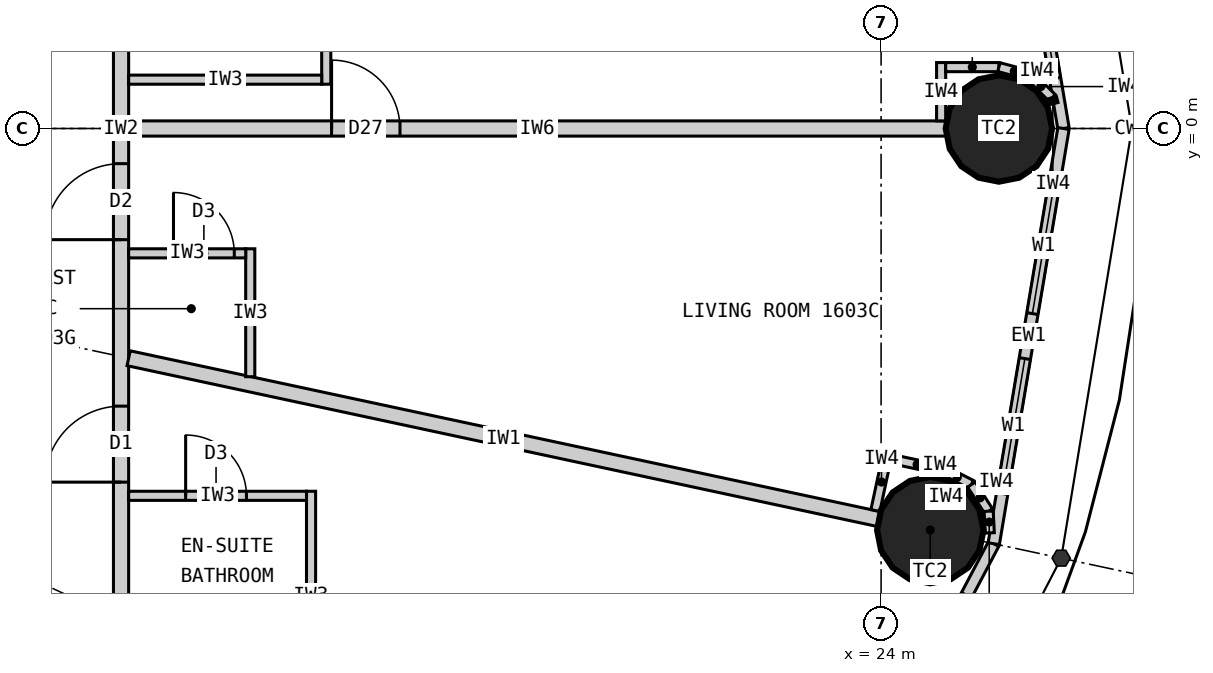
"""IFC4 building model, lengths in metres.
Left out: names, types, materials, properties, quantities, classifications, styles, units other than length and angle.
Written with IfcOpenShell. Run it as: python <this file> out.ifc"""

import sys

from ifc_helpers import new_model, si_unit, direction, frame, frame_2d, origin, origin_2d, place, context, subcontext, project, spatial, rectangle, circle, extrude, element, fill, save


model = new_model("IFC4")
c1 = context("Model", 3, precision=1e-05, world=origin(), true_north=direction((0.0, 1.0)))
c2 = subcontext(c1, "Body", "Model", "MODEL_VIEW")
j1 = project(units=[si_unit("LENGTHUNIT", "METRE"), si_unit("PLANEANGLEUNIT", "RADIAN")], contexts=[c1])
p1 = place(None, origin())
s1 = spatial("IfcSite", under=j1, at=p1, CompositionType="ELEMENT")
p2 = place(p1, origin())
s2 = spatial("IfcBuilding", under=s1, at=p2, CompositionType="ELEMENT")
p3 = place(p2, frame((0.0, 0.0, 67.2)))
s3 = spatial("IfcBuildingStorey", under=s2, at=p3, CompositionType="ELEMENT", Elevation=67.2)
for number, where, z_axis, x_axis in (
    (1, (25.55, 0.0, 0.0), (0.0, 0.0, 1.0), (1.0, 0.0, 0.0)),
    (2, (24.647, -5.283, 0.0), (0.0, 0.0, 1.0), (1.0, 0.0, 0.0)),
):
    element("IfcColumn", number, at=place(p3, frame(where, z_axis=z_axis, x_axis=x_axis)), inside=s3, PredefinedType="COLUMN", context=c2, shape_type="SweptSolid", body=[
        extrude(circle(Radius=0.7, at=origin_2d()), origin(), (0.0, 0.0, 1.0), 3.3),
    ])
p4 = place(p3, frame((26.4, 0.0, 0.0), z_axis=(0.0, 0.0, 1.0), x_axis=(-0.165642551694, 0.986185857264, 0.0)))
e3 = element("IfcWall", 3, at=p4, inside=s3, PredefinedType="ELEMENTEDWALL", context=c2, shape_type="SweptSolid", body=[
    extrude(rectangle(XDim=5.539, YDim=0.15, at=frame_2d((2.77, 0.0))), origin(), (0.0, 0.0, 1.0), 3.12),
])
p5 = place(p4, frame((0.669, 0.0, 0.9)))
e4 = element("IfcOpeningElement", 4, at=p5, cuts=e3, PredefinedType="OPENING", context=c2, shape_type="SweptSolid", body=[
    extrude(rectangle(XDim=1.8, YDim=1.9, at=frame_2d((0.9, 0.95))), frame((0.0, 0.085, 0.0), z_axis=(0.0, -1.0, 0.0), x_axis=(1.0, 0.0, 0.0)), (0.0, 0.0, 1.0), 0.17),
])
p6 = place(p4, frame((3.07, 0.0, 0.9)))
e5 = element("IfcOpeningElement", 5, at=p6, cuts=e3, PredefinedType="OPENING", context=c2, shape_type="SweptSolid", body=[
    extrude(rectangle(XDim=1.8, YDim=1.9, at=frame_2d((0.9, 0.95))), frame((0.0, 0.085, 0.0), z_axis=(0.0, -1.0, 0.0), x_axis=(1.0, 0.0, 0.0)), (0.0, 0.0, 1.0), 0.17),
])
p7 = place(p3, frame((22.803, -10.532, 0.0), z_axis=(0.0, 0.0, 1.0), x_axis=(0.467296867008, 0.884100468321, 0.0)))
e6 = element("IfcWall", 6, at=p7, inside=s3, PredefinedType="ELEMENTEDWALL", context=c2, shape_type="SweptSolid", body=[
    extrude(rectangle(XDim=5.734, YDim=0.15, at=frame_2d((2.867, 0.0))), origin(), (0.0, 0.0, 1.0), 3.12),
])
p8 = place(p7, frame((0.767, 0.0, 0.9)))
e7 = element("IfcOpeningElement", 7, at=p8, cuts=e6, PredefinedType="OPENING", context=c2, shape_type="SweptSolid", body=[
    extrude(rectangle(XDim=1.8, YDim=1.9, at=frame_2d((0.9, 0.95))), frame((0.0, 0.085, 0.0), z_axis=(0.0, -1.0, 0.0), x_axis=(1.0, 0.0, 0.0)), (0.0, 0.0, 1.0), 0.17),
])
p9 = place(p7, frame((3.167, 0.0, 0.9)))
e8 = element("IfcOpeningElement", 8, at=p9, cuts=e6, PredefinedType="OPENING", context=c2, shape_type="SweptSolid", body=[
    extrude(rectangle(XDim=1.8, YDim=1.9, at=frame_2d((0.9, 0.95))), frame((0.0, 0.085, 0.0), z_axis=(0.0, -1.0, 0.0), x_axis=(1.0, 0.0, 0.0)), (0.0, 0.0, 1.0), 0.17),
])
p10 = place(p3, frame((25.482, -5.462, 0.0), z_axis=(0.0, 0.0, 1.0), x_axis=(0.165642551694, 0.986185857264, 0.0)))
e9 = element("IfcWall", 9, at=p10, inside=s3, PredefinedType="ELEMENTEDWALL", context=c2, shape_type="SweptSolid", body=[
    extrude(rectangle(XDim=5.539, YDim=0.15, at=frame_2d((2.77, 0.0))), origin(), (0.0, 0.0, 1.0), 3.12),
])
p11 = place(p10, frame((0.669, 0.0, 0.9)))
e10 = element("IfcOpeningElement", 10, at=p11, cuts=e9, PredefinedType="OPENING", context=c2, shape_type="SweptSolid", body=[
    extrude(rectangle(XDim=1.8, YDim=1.9, at=frame_2d((0.9, 0.95))), frame((0.0, 0.085, 0.0), z_axis=(0.0, -1.0, 0.0), x_axis=(1.0, 0.0, 0.0)), (0.0, 0.0, 1.0), 0.17),
])
p12 = place(p10, frame((3.07, 0.0, 0.9)))
e11 = element("IfcOpeningElement", 11, at=p12, cuts=e9, PredefinedType="OPENING", context=c2, shape_type="SweptSolid", body=[
    extrude(rectangle(XDim=1.8, YDim=1.9, at=frame_2d((0.9, 0.95))), frame((0.0, 0.085, 0.0), z_axis=(0.0, -1.0, 0.0), x_axis=(1.0, 0.0, 0.0)), (0.0, 0.0, 1.0), 0.17),
])
p13 = place(p3, frame((14.0, -9.9, 0.0), z_axis=(0.0, 0.0, 1.0), x_axis=(0.0, 1.0, 0.0)))
e12 = element("IfcWall", 12, at=p13, inside=s3, PredefinedType="PARTITIONING", context=c2, shape_type="SweptSolid", body=[
    extrude(rectangle(XDim=19.8, YDim=0.2, at=frame_2d((9.9, 0.0))), origin(), (0.0, 0.0, 1.0), 3.12),
])
p14 = place(p13, frame((0.103, 0.0, 0.0)))
e13 = element("IfcOpeningElement", 13, at=p14, cuts=e12, PredefinedType="OPENING", context=c2, shape_type="SweptSolid", body=[
    extrude(rectangle(XDim=1.0, YDim=2.2, at=frame_2d((0.5, 1.1))), frame((0.0, 0.11, 0.0), z_axis=(0.0, -1.0, 0.0), x_axis=(1.0, 0.0, 0.0)), (0.0, 0.0, 1.0), 0.22),
])
p15 = place(p13, frame((5.248, 0.0, 0.0)))
e14 = element("IfcOpeningElement", 14, at=p15, cuts=e12, PredefinedType="OPENING", context=c2, shape_type="SweptSolid", body=[
    extrude(rectangle(XDim=1.0, YDim=2.2, at=frame_2d((0.5, 1.1))), frame((0.0, 0.11, 0.0), z_axis=(0.0, -1.0, 0.0), x_axis=(1.0, 0.0, 0.0)), (0.0, 0.0, 1.0), 0.22),
])
p16 = place(p13, frame((8.438, 0.0, 0.0)))
e15 = element("IfcOpeningElement", 15, at=p16, cuts=e12, PredefinedType="OPENING", context=c2, shape_type="SweptSolid", body=[
    extrude(rectangle(XDim=1.0, YDim=2.2, at=frame_2d((0.5, 1.1))), frame((0.0, 0.11, 0.0), z_axis=(0.0, -1.0, 0.0), x_axis=(1.0, 0.0, 0.0)), (0.0, 0.0, 1.0), 0.22),
])
p17 = place(p13, frame((14.532, 0.0, 0.0)))
e16 = element("IfcOpeningElement", 16, at=p17, cuts=e12, PredefinedType="OPENING", context=c2, shape_type="SweptSolid", body=[
    extrude(rectangle(XDim=1.0, YDim=2.2, at=frame_2d((0.5, 1.1))), frame((0.0, 0.11, 0.0), z_axis=(0.0, -1.0, 0.0), x_axis=(1.0, 0.0, 0.0)), (0.0, 0.0, 1.0), 0.22),
])
p18 = place(p3, frame((14.1, 0.0, 0.0), z_axis=(0.0, 0.0, 1.0), x_axis=(1.0, 0.0, 0.0)))
e17 = element("IfcWall", 17, at=p18, inside=s3, PredefinedType="PARTITIONING", context=c2, shape_type="SweptSolid", body=[
    extrude(rectangle(XDim=10.75, YDim=0.2, at=frame_2d((5.375, 0.0))), origin(), (0.0, 0.0, 1.0), 2.27),
])
p19 = place(p18, frame((2.67, 0.0, 0.0)))
e18 = element("IfcOpeningElement", 18, at=p19, cuts=e17, PredefinedType="OPENING", context=c2, shape_type="SweptSolid", body=[
    extrude(rectangle(XDim=0.9, YDim=2.1, at=frame_2d((0.45, 1.05))), frame((0.0, 0.11, 0.0), z_axis=(0.0, -1.0, 0.0), x_axis=(1.0, 0.0, 0.0)), (0.0, 0.0, 1.0), 0.22),
])
p20 = place(p3, frame((14.1, -3.022, 0.0), z_axis=(0.0, 0.0, 1.0), x_axis=(0.977790014929, -0.209586943072, 0.0)))
e19 = element("IfcWall", 19, at=p20, inside=s3, PredefinedType="PARTITIONING", context=c2, shape_type="SweptSolid", body=[
    extrude(rectangle(XDim=10.087, YDim=0.2, at=frame_2d((5.043, 0.0))), origin(), (0.0, 0.0, 1.0), 2.32),
])
p21 = place(p3, frame((16.5, -7.521, 0.0), z_axis=(0.0, 0.0, 1.0), x_axis=(0.0, 1.0, 0.0)))
e20 = element("IfcWall", 20, at=p21, inside=s3, PredefinedType="PARTITIONING", context=c2, shape_type="SweptSolid", body=[
    extrude(rectangle(XDim=2.749, YDim=0.12, at=frame_2d((1.374, 0.0))), origin(), (0.0, 0.0, 1.0), 3.12),
])
p22 = place(p3, frame((14.1, -4.833, 0.0), z_axis=(0.0, 0.0, 1.0), x_axis=(1.0, 0.0, 0.0)))
e21 = element("IfcWall", 21, at=p22, inside=s3, PredefinedType="PARTITIONING", context=c2, shape_type="SweptSolid", body=[
    extrude(rectangle(XDim=2.34, YDim=0.12, at=frame_2d((1.17, 0.0))), origin(), (0.0, 0.0, 1.0), 3.12),
])
p23 = place(p22, frame((0.75, 0.0, 0.0)))
e22 = element("IfcOpeningElement", 22, at=p23, cuts=e21, PredefinedType="OPENING", context=c2, shape_type="SweptSolid", body=[
    extrude(rectangle(XDim=0.8, YDim=2.1, at=frame_2d((0.4, 1.05))), frame((0.0, 0.07, 0.0), z_axis=(0.0, -1.0, 0.0), x_axis=(1.0, 0.0, 0.0)), (0.0, 0.0, 1.0), 0.14),
])
p24 = place(p3, frame((15.7, -3.265, 0.0), z_axis=(0.0, 0.0, 1.0), x_axis=(0.0, 1.0, 0.0)))
e23 = element("IfcWall", 23, at=p24, inside=s3, PredefinedType="PARTITIONING", context=c2, shape_type="SweptSolid", body=[
    extrude(rectangle(XDim=1.683, YDim=0.12, at=frame_2d((0.841, 0.0))), origin(), (0.0, 0.0, 1.0), 3.12),
])
p25 = place(p3, frame((14.1, -1.643, 0.0), z_axis=(0.0, 0.0, 1.0), x_axis=(1.0, 0.0, 0.0)))
e24 = element("IfcWall", 24, at=p25, inside=s3, PredefinedType="PARTITIONING", context=c2, shape_type="SweptSolid", body=[
    extrude(rectangle(XDim=1.54, YDim=0.12, at=frame_2d((0.77, 0.0))), origin(), (0.0, 0.0, 1.0), 2.32),
])
p26 = place(p25, frame((0.59, 0.0, 0.0)))
e25 = element("IfcOpeningElement", 25, at=p26, cuts=e24, PredefinedType="OPENING", context=c2, shape_type="SweptSolid", body=[
    extrude(rectangle(XDim=0.8, YDim=2.1, at=frame_2d((0.4, 1.05))), frame((0.0, 0.07, 0.0), z_axis=(0.0, -1.0, 0.0), x_axis=(1.0, 0.0, 0.0)), (0.0, 0.0, 1.0), 0.14),
])
p27 = place(p3, frame((16.7, 3.48, 0.0), z_axis=(0.0, 0.0, 1.0), x_axis=(0.0, -1.0, 0.0)))
e26 = element("IfcWall", 26, at=p27, inside=s3, PredefinedType="PARTITIONING", context=c2, shape_type="SweptSolid", body=[
    extrude(rectangle(XDim=2.897, YDim=0.12, at=frame_2d((1.449, 0.0))), origin(), (0.0, 0.0, 1.0), 3.12),
])
p28 = place(p27, frame((1.049, 0.0, 0.0)))
e27 = element("IfcOpeningElement", 27, at=p28, cuts=e26, PredefinedType="OPENING", context=c2, shape_type="SweptSolid", body=[
    extrude(rectangle(XDim=0.8, YDim=2.1, at=frame_2d((0.4, 1.05))), frame((0.0, 0.07, 0.0), z_axis=(0.0, -1.0, 0.0), x_axis=(1.0, 0.0, 0.0)), (0.0, 0.0, 1.0), 0.14),
])
p29 = place(p3, frame((14.1, 0.643, 0.0), z_axis=(0.0, 0.0, 1.0), x_axis=(1.0, 0.0, 0.0)))
e28 = element("IfcWall", 28, at=p29, inside=s3, PredefinedType="PARTITIONING", context=c2, shape_type="SweptSolid", body=[
    extrude(rectangle(XDim=2.54, YDim=0.12, at=frame_2d((1.27, 0.0))), origin(), (0.0, 0.0, 1.0), 3.12),
])
p30 = place(p3, frame((24.79, 0.1, 0.0), z_axis=(0.0, 0.0, 1.0), x_axis=(0.0, 1.0, 0.0)))
e29 = element("IfcWall", 29, at=p30, inside=s3, PredefinedType="PARTITIONING", context=c2, shape_type="SweptSolid", body=[
    extrude(rectangle(XDim=0.767, YDim=0.12, at=frame_2d((0.384, 0.0))), origin(), (0.0, 0.0, 1.0), 3.12),
])
p31 = place(p3, frame((24.85, 0.808, 0.0), z_axis=(0.0, 0.0, 1.0), x_axis=(1.0, 0.0, 0.0)))
e30 = element("IfcWall", 30, at=p31, inside=s3, PredefinedType="PARTITIONING", context=c2, shape_type="SweptSolid", body=[
    extrude(rectangle(XDim=0.7, YDim=0.12, at=frame_2d((0.35, 0.0))), origin(), (0.0, 0.0, 1.0), 3.12),
])
p32 = place(p3, frame((25.55, 0.808, 0.0), z_axis=(0.0, 0.0, 1.0), x_axis=(0.965807183573, -0.2592614205, 0.0)))
e31 = element("IfcWall", 31, at=p32, inside=s3, PredefinedType="PARTITIONING", context=c2, shape_type="SweptSolid", body=[
    extrude(rectangle(XDim=0.418, YDim=0.12, at=frame_2d((0.209, 0.0))), origin(), (0.0, 0.0, 1.0), 3.12),
])
p33 = place(p3, frame((25.954, 0.699, 0.0), z_axis=(0.0, 0.0, 1.0), x_axis=(0.707106781187, -0.707106781187, 0.0)))
e32 = element("IfcWall", 32, at=p33, inside=s3, PredefinedType="PARTITIONING", context=c2, shape_type="SweptSolid", body=[
    extrude(rectangle(XDim=0.418, YDim=0.12, at=frame_2d((0.209, 0.0))), origin(), (0.0, 0.0, 1.0), 3.12),
])
p34 = place(p3, frame((26.249, 0.404, 0.0), z_axis=(0.0, 0.0, 1.0), x_axis=(0.259754282609, -0.965674744759, 0.0)))
e33 = element("IfcWall", 33, at=p34, inside=s3, PredefinedType="PARTITIONING", context=c2, shape_type="SweptSolid", body=[
    extrude(rectangle(XDim=0.08, YDim=0.12, at=frame_2d((0.04, 0.0))), origin(), (0.0, 0.0, 1.0), 3.12),
])
p35 = place(p3, frame((23.925, -5.026, 0.0), z_axis=(0.0, 0.0, 1.0), x_axis=(0.209681192172, 0.977769808109, 0.0)))
e34 = element("IfcWall", 34, at=p35, inside=s3, PredefinedType="PARTITIONING", context=c2, shape_type="SweptSolid", body=[
    extrude(rectangle(XDim=0.767, YDim=0.12, at=frame_2d((0.384, 0.0))), origin(), (0.0, 0.0, 1.0), 3.12),
])
p36 = place(p3, frame((24.132, -4.347, 0.0), z_axis=(0.0, 0.0, 1.0), x_axis=(0.977776882509, -0.209648200638, 0.0)))
e35 = element("IfcWall", 35, at=p36, inside=s3, PredefinedType="PARTITIONING", context=c2, shape_type="SweptSolid", body=[
    extrude(rectangle(XDim=0.7, YDim=0.12, at=frame_2d((0.35, 0.0))), origin(), (0.0, 0.0, 1.0), 3.12),
])
for number, where, z_axis, x_axis in (
    (36, (24.816, -4.494, 0.0), (0.0, 0.0, 1.0), (0.89, -0.455, 0.0)),
    (37, (25.188, -4.684, 0.0), (0.0, 0.0, 1.0), (0.543, -0.84, 0.0)),
):
    element("IfcWall", number, at=place(p3, frame(where, z_axis=z_axis, x_axis=x_axis)), inside=s3, PredefinedType="PARTITIONING", context=c2, shape_type="SweptSolid", body=[
        extrude(rectangle(XDim=0.418, YDim=0.12, at=frame_2d((0.209, 0.0))), origin(), (0.0, 0.0, 1.0), 3.12),
    ])
p37 = place(p3, frame((25.416, -5.035, 0.0), z_axis=(0.0, 0.0, 1.0), x_axis=(0.050406329159, -0.998728793007, 0.0)))
e38 = element("IfcWall", 38, at=p37, inside=s3, PredefinedType="PARTITIONING", context=c2, shape_type="SweptSolid", body=[
    extrude(rectangle(XDim=0.286, YDim=0.12, at=frame_2d((0.143, 0.0))), origin(), (0.0, 0.0, 1.0), 3.12),
])
p38 = place(p5, origin())
e39 = element("IfcWindow", 39, at=p38, inside=s3, PartitioningType="SINGLE_PANEL", PredefinedType="WINDOW", context=c2, shape_type="SweptSolid", body=[
    extrude(rectangle(XDim=1.8, YDim=1.9, at=frame_2d((0.9, 0.95))), frame((0.0, 0.03, 0.0), z_axis=(0.0, -1.0, 0.0), x_axis=(1.0, 0.0, 0.0)), (0.0, 0.0, 1.0), 0.06),
])
fill(e4, e39)
p39 = place(p11, origin())
e40 = element("IfcWindow", 40, at=p39, inside=s3, PartitioningType="SINGLE_PANEL", PredefinedType="WINDOW", context=c2, shape_type="SweptSolid", body=[
    extrude(rectangle(XDim=1.8, YDim=1.9, at=frame_2d((0.9, 0.95))), frame((0.0, 0.03, 0.0), z_axis=(0.0, -1.0, 0.0), x_axis=(1.0, 0.0, 0.0)), (0.0, 0.0, 1.0), 0.06),
])
fill(e10, e40)
p40 = place(p12, origin())
e41 = element("IfcWindow", 41, at=p40, inside=s3, PartitioningType="SINGLE_PANEL", PredefinedType="WINDOW", context=c2, shape_type="SweptSolid", body=[
    extrude(rectangle(XDim=1.8, YDim=1.9, at=frame_2d((0.9, 0.95))), frame((0.0, 0.03, 0.0), z_axis=(0.0, -1.0, 0.0), x_axis=(1.0, 0.0, 0.0)), (0.0, 0.0, 1.0), 0.06),
])
fill(e11, e41)
p41 = place(p23, origin())
e42 = element("IfcDoor", 42, at=p41, inside=s3, OperationType="SINGLE_SWING_LEFT", PredefinedType="DOOR", context=c2, shape_type="SweptSolid", body=[
    extrude(rectangle(XDim=0.8, YDim=2.1, at=frame_2d((0.4, 1.05))), frame((0.0, 0.025, 0.0), z_axis=(0.0, -1.0, 0.0), x_axis=(1.0, 0.0, 0.0)), (0.0, 0.0, 1.0), 0.05),
])
fill(e22, e42)
p42 = place(p15, origin())
e43 = element("IfcDoor", 43, at=p42, inside=s3, OperationType="SINGLE_SWING_LEFT", PredefinedType="DOOR", context=c2, shape_type="SweptSolid", body=[
    extrude(rectangle(XDim=1.0, YDim=2.2, at=frame_2d((0.5, 1.1))), frame((0.0, 0.025, 0.0), z_axis=(0.0, -1.0, 0.0), x_axis=(1.0, 0.0, 0.0)), (0.0, 0.0, 1.0), 0.05),
])
fill(e14, e43)
p43 = place(p26, origin())
e44 = element("IfcDoor", 44, at=p43, inside=s3, OperationType="SINGLE_SWING_LEFT", PredefinedType="DOOR", context=c2, shape_type="SweptSolid", body=[
    extrude(rectangle(XDim=0.8, YDim=2.1, at=frame_2d((0.4, 1.05))), frame((0.0, 0.025, 0.0), z_axis=(0.0, -1.0, 0.0), x_axis=(1.0, 0.0, 0.0)), (0.0, 0.0, 1.0), 0.05),
])
fill(e25, e44)
p44 = place(p16, origin())
e45 = element("IfcDoor", 45, at=p44, inside=s3, OperationType="SINGLE_SWING_LEFT", PredefinedType="DOOR", context=c2, shape_type="SweptSolid", body=[
    extrude(rectangle(XDim=1.0, YDim=2.2, at=frame_2d((0.5, 1.1))), frame((0.0, 0.025, 0.0), z_axis=(0.0, -1.0, 0.0), x_axis=(1.0, 0.0, 0.0)), (0.0, 0.0, 1.0), 0.05),
])
fill(e15, e45)
p45 = place(p19, origin())
e46 = element("IfcDoor", 46, at=p45, inside=s3, OperationType="SINGLE_SWING_LEFT", PredefinedType="DOOR", context=c2, shape_type="SweptSolid", body=[
    extrude(rectangle(XDim=0.9, YDim=2.1, at=frame_2d((0.45, 1.05))), frame((0.0, 0.025, 0.0), z_axis=(0.0, -1.0, 0.0), x_axis=(1.0, 0.0, 0.0)), (0.0, 0.0, 1.0), 0.05),
])
fill(e18, e46)
save(model, sys.argv[1])
